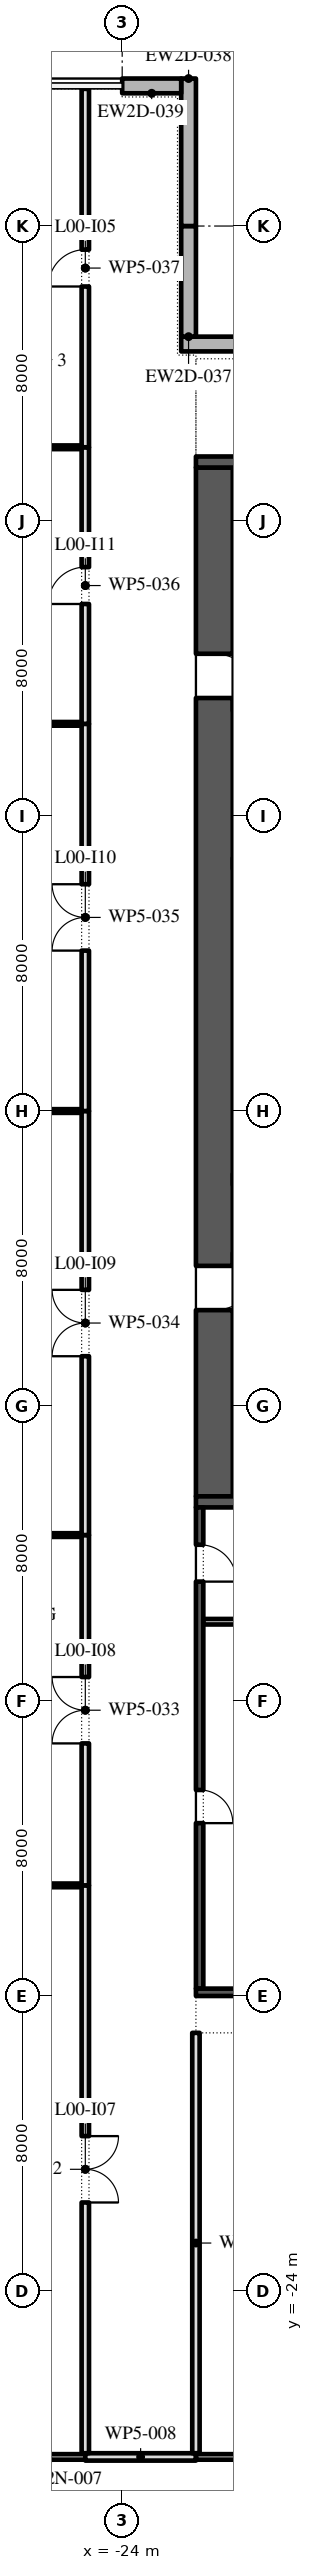
"""IFC4 building model, lengths in metres.
Left out: names, types, materials, properties, quantities, classifications, styles, units other than length and angle.
Written with IfcOpenShell. Run it as: python <this file> out.ifc"""

import sys

from ifc_helpers import new_model, si_unit, direction, frame, frame_2d, origin, place, context, subcontext, project, spatial, rectangle, extrude, element, fill, save


model = new_model("IFC4")
c1 = context("Model", 3, precision=1e-05, world=origin(), true_north=direction((0.0, 1.0)))
c2 = subcontext(c1, "Body", "Model", "MODEL_VIEW")
j1 = project(units=[si_unit("LENGTHUNIT", "METRE"), si_unit("PLANEANGLEUNIT", "RADIAN")], contexts=[c1])
p1 = place(None, origin())
s1 = spatial("IfcSite", under=j1, at=p1, CompositionType="ELEMENT")
p2 = place(p1, origin())
s2 = spatial("IfcBuilding", under=s1, at=p2, CompositionType="ELEMENT")
p3 = place(p2, origin())
s3 = spatial("IfcBuildingStorey", under=s2, at=p3, CompositionType="ELEMENT", Elevation=0.0)
p4 = place(p3, frame((-16.0, 28.8, 0.0), z_axis=(0.0, 0.0, 1.0), x_axis=(-1.0, 0.0, 0.0)))
e1 = element("IfcWall", 1, at=p4, inside=s3, PredefinedType="STANDARD", context=c2, shape_type="SweptSolid", body=[
    extrude(rectangle(XDim=6.4, YDim=0.4, at=frame_2d((3.2, 0.0))), origin(), (0.0, 0.0, 1.0), 7.7),
])
p5 = place(p3, frame((-22.2, 29.0, 0.0), z_axis=(0.0, 0.0, 1.0), x_axis=(0.0, 1.0, 0.0)))
e2 = element("IfcWall", 2, at=p5, inside=s3, PredefinedType="STANDARD", context=c2, shape_type="SweptSolid", body=[
    extrude(rectangle(XDim=3.0, YDim=0.4, at=frame_2d((1.5, 0.0))), origin(), (0.0, 0.0, 1.0), 7.7),
])
p6 = place(p3, frame((-22.2, 32.0, 0.0), z_axis=(0.0, 0.0, 1.0), x_axis=(0.0, 1.0, 0.0)))
e3 = element("IfcWall", 3, at=p6, inside=s3, PredefinedType="STANDARD", context=c2, shape_type="SweptSolid", body=[
    extrude(rectangle(XDim=4.0, YDim=0.4, at=frame_2d((2.0, 0.0))), origin(), (0.0, 0.0, 1.0), 7.7),
])
p7 = place(p3, frame((-22.4, 35.8, 0.0), z_axis=(0.0, 0.0, 1.0), x_axis=(-1.0, 0.0, 0.0)))
e4 = element("IfcWall", 4, at=p7, inside=s3, PredefinedType="STANDARD", context=c2, shape_type="SweptSolid", body=[
    extrude(rectangle(XDim=1.6, YDim=0.4, at=frame_2d((0.8, 0.0))), origin(), (0.0, 0.0, 1.0), 7.7),
])
p8 = place(p3, frame((-21.5, -2.45, 0.0), z_axis=(0.0, 0.0, 1.0), x_axis=(0.0, 1.0, 0.0)))
e5 = element("IfcWall", 5, at=p8, inside=s3, PredefinedType="SHEAR", context=c2, shape_type="SweptSolid", body=[
    extrude(rectangle(XDim=27.9, YDim=1.0, at=frame_2d((13.95, 0.0))), origin(), (0.0, 0.0, 1.0), 7.7),
])
p9 = place(p8, frame((5.05, 0.0, 0.0)))
e6 = element("IfcOpeningElement", 6, at=p9, cuts=e5, PredefinedType="OPENING", context=c2, shape_type="SweptSolid", body=[
    extrude(rectangle(XDim=1.2, YDim=2.1, at=frame_2d((0.6, 1.05))), frame((0.0, 0.51, 0.0), z_axis=(0.0, -1.0, 0.0), x_axis=(1.0, 0.0, 0.0)), (0.0, 0.0, 1.0), 1.02),
])
p10 = place(p8, frame((21.65, 0.0, 0.0)))
e7 = element("IfcOpeningElement", 7, at=p10, cuts=e5, PredefinedType="OPENING", context=c2, shape_type="SweptSolid", body=[
    extrude(rectangle(XDim=1.2, YDim=2.1, at=frame_2d((0.6, 1.05))), frame((0.0, 0.51, 0.0), z_axis=(0.0, -1.0, 0.0), x_axis=(1.0, 0.0, 0.0)), (0.0, 0.0, 1.0), 1.02),
])
for number, where, z_axis, x_axis in (
    (8, (-22.0, -2.6, 0.0), (0.0, 0.0, 1.0), (1.0, 0.0, 0.0)),
    (9, (-22.0, 25.6, 0.0), (0.0, 0.0, 1.0), (1.0, 0.0, 0.0)),
):
    element("IfcWall", number, at=place(p3, frame(where, z_axis=z_axis, x_axis=x_axis)), inside=s3, PredefinedType="SHEAR", context=c2, shape_type="SweptSolid", body=[
        extrude(rectangle(XDim=12.0, YDim=0.3, at=frame_2d((6.0, 0.0))), origin(), (0.0, 0.0, 1.0), 7.7),
    ])
p11 = place(p3, frame((-21.9, -15.8, 0.0), z_axis=(0.0, 0.0, 1.0), x_axis=(0.0, 1.0, 0.0)))
e10 = element("IfcWall", 10, at=p11, inside=s3, PredefinedType="SHEAR", context=c2, shape_type="SweptSolid", body=[
    extrude(rectangle(XDim=13.05, YDim=0.2, at=frame_2d((6.525, 0.0))), origin(), (0.0, 0.0, 1.0), 7.7),
])
p12 = place(p11, frame((4.488, 0.0, 0.0)))
e11 = element("IfcOpeningElement", 11, at=p12, cuts=e10, PredefinedType="OPENING", context=c2, shape_type="SweptSolid", body=[
    extrude(rectangle(XDim=0.9, YDim=2.1, at=frame_2d((0.45, 1.05))), frame((0.0, 0.11, 0.0), z_axis=(0.0, -1.0, 0.0), x_axis=(1.0, 0.0, 0.0)), (0.0, 0.0, 1.0), 0.22),
])
p13 = place(p11, frame((11.038, 0.0, 0.0)))
e12 = element("IfcOpeningElement", 12, at=p13, cuts=e10, PredefinedType="OPENING", context=c2, shape_type="SweptSolid", body=[
    extrude(rectangle(XDim=1.0, YDim=2.1, at=frame_2d((0.5, 1.05))), frame((0.0, 0.11, 0.0), z_axis=(0.0, -1.0, 0.0), x_axis=(1.0, 0.0, 0.0)), (0.0, 0.0, 1.0), 0.22),
])
p14 = place(p3, frame((-22.0, -15.9, 0.0), z_axis=(0.0, 0.0, 1.0), x_axis=(1.0, 0.0, 0.0)))
e13 = element("IfcWall", 13, at=p14, inside=s3, PredefinedType="SHEAR", context=c2, shape_type="SweptSolid", body=[
    extrude(rectangle(XDim=12.0, YDim=0.2, at=frame_2d((6.0, 0.0))), origin(), (0.0, 0.0, 1.0), 7.7),
])
p15 = place(p3, frame((-21.8, -5.85, 0.0), z_axis=(0.0, 0.0, 1.0), x_axis=(1.0, 0.0, 0.0)))
e14 = element("IfcWall", 14, at=p15, inside=s3, PredefinedType="PARTITIONING", context=c2, shape_type="SweptSolid", body=[
    extrude(rectangle(XDim=5.725, YDim=0.15, at=frame_2d((2.863, 0.0))), origin(), (0.0, 0.0, 1.0), 7.7),
])
p16 = place(p3, frame((-27.0, -28.5, 0.0), z_axis=(0.0, 0.0, 1.0), x_axis=(1.0, 0.0, 0.0)))
e15 = element("IfcWall", 15, at=p16, inside=s3, PredefinedType="PARTITIONING", context=c2, shape_type="SweptSolid", body=[
    extrude(rectangle(XDim=2.0, YDim=0.15, at=frame_2d((1.0, 0.0))), origin(), (0.0, 0.0, 1.0), 7.7),
])
p17 = place(p3, frame((-25.0, -28.5, 0.0), z_axis=(0.0, 0.0, 1.0), x_axis=(1.0, 0.0, 0.0)))
e16 = element("IfcWall", 16, at=p17, inside=s3, PredefinedType="PARTITIONING", context=c2, shape_type="SweptSolid", body=[
    extrude(rectangle(XDim=3.0, YDim=0.2, at=frame_2d((1.5, 0.0))), origin(), (0.0, 0.0, 1.0), 7.7),
])
p18 = place(p3, frame((-22.0, -28.5, 0.0), z_axis=(0.0, 0.0, 1.0), x_axis=(1.0, 0.0, 0.0)))
e17 = element("IfcWall", 17, at=p18, inside=s3, PredefinedType="PARTITIONING", context=c2, shape_type="SweptSolid", body=[
    extrude(rectangle(XDim=11.6, YDim=0.15, at=frame_2d((5.8, 0.0))), origin(), (0.0, 0.0, 1.0), 7.7),
])
p19 = place(p18, frame((5.3, 0.0, 0.0)))
e18 = element("IfcOpeningElement", 18, at=p19, cuts=e17, PredefinedType="OPENING", context=c2, shape_type="SweptSolid", body=[
    extrude(rectangle(XDim=1.0, YDim=2.1, at=frame_2d((0.5, 1.05))), frame((0.0, 0.085, 0.0), z_axis=(0.0, -1.0, 0.0), x_axis=(1.0, 0.0, 0.0)), (0.0, 0.0, 1.0), 0.17),
])
p20 = place(p3, frame((-43.72, -13.0, 0.0), z_axis=(0.0, 0.0, 1.0), x_axis=(1.0, 0.0, 0.0)))
e19 = element("IfcWall", 19, at=p20, inside=s3, PredefinedType="PARTITIONING", context=c2, shape_type="SweptSolid", body=[
    extrude(rectangle(XDim=18.62, YDim=0.1, at=frame_2d((9.31, 0.0))), origin(), (0.0, 0.0, 1.0), 7.7),
])
p21 = place(p3, frame((-31.7, -3.5, 0.0), z_axis=(0.0, 0.0, 1.0), x_axis=(1.0, 0.0, 0.0)))
e20 = element("IfcWall", 20, at=p21, inside=s3, PredefinedType="PARTITIONING", context=c2, shape_type="SweptSolid", body=[
    extrude(rectangle(XDim=6.6, YDim=0.1, at=frame_2d((3.3, 0.0))), origin(), (0.0, 0.0, 1.0), 7.7),
])
p22 = place(p3, frame((-43.72, 8.0, 0.0), z_axis=(0.0, 0.0, 1.0), x_axis=(1.0, 0.0, 0.0)))
e21 = element("IfcWall", 21, at=p22, inside=s3, PredefinedType="PARTITIONING", context=c2, shape_type="SweptSolid", body=[
    extrude(rectangle(XDim=18.62, YDim=0.1, at=frame_2d((9.31, 0.0))), origin(), (0.0, 0.0, 1.0), 7.7),
])
p23 = place(p3, frame((-43.5, 18.5, 0.0), z_axis=(0.0, 0.0, 1.0), x_axis=(1.0, 0.0, 0.0)))
e22 = element("IfcWall", 22, at=p23, inside=s3, PredefinedType="PARTITIONING", context=c2, shape_type="SweptSolid", body=[
    extrude(rectangle(XDim=18.4, YDim=0.1, at=frame_2d((9.2, 0.0))), origin(), (0.0, 0.0, 1.0), 7.7),
])
p24 = place(p3, frame((-34.0, 26.0, 0.0), z_axis=(0.0, 0.0, 1.0), x_axis=(1.0, 0.0, 0.0)))
e23 = element("IfcWall", 23, at=p24, inside=s3, PredefinedType="PARTITIONING", context=c2, shape_type="SweptSolid", body=[
    extrude(rectangle(XDim=8.9, YDim=0.1, at=frame_2d((4.45, 0.0))), origin(), (0.0, 0.0, 1.0), 7.7),
])
p25 = place(p3, frame((-25.0, -28.4, 0.0), z_axis=(0.0, 0.0, 1.0), x_axis=(0.0, 1.0, 0.0)))
e24 = element("IfcWall", 24, at=p25, inside=s3, PredefinedType="PARTITIONING", context=c2, shape_type="SweptSolid", body=[
    extrude(rectangle(XDim=15.4, YDim=0.2, at=frame_2d((7.7, 0.0))), origin(), (0.0, 0.0, 1.0), 7.7),
])
p26 = place(p25, frame((6.8, 0.0, 0.0)))
e25 = element("IfcOpeningElement", 25, at=p26, cuts=e24, PredefinedType="OPENING", context=c2, shape_type="SweptSolid", body=[
    extrude(rectangle(XDim=1.8, YDim=2.1, at=frame_2d((0.9, 1.05))), frame((0.0, 0.11, 0.0), z_axis=(0.0, -1.0, 0.0), x_axis=(1.0, 0.0, 0.0)), (0.0, 0.0, 1.0), 0.22),
])
p27 = place(p3, frame((-25.0, -13.0, 0.0), z_axis=(0.0, 0.0, 1.0), x_axis=(0.0, 1.0, 0.0)))
e26 = element("IfcWall", 26, at=p27, inside=s3, PredefinedType="PARTITIONING", context=c2, shape_type="SweptSolid", body=[
    extrude(rectangle(XDim=9.5, YDim=0.2, at=frame_2d((4.75, 0.0))), origin(), (0.0, 0.0, 1.0), 7.7),
])
p28 = place(p27, frame((3.85, 0.0, 0.0)))
e27 = element("IfcOpeningElement", 27, at=p28, cuts=e26, PredefinedType="OPENING", context=c2, shape_type="SweptSolid", body=[
    extrude(rectangle(XDim=1.8, YDim=2.1, at=frame_2d((0.9, 1.05))), frame((0.0, 0.11, 0.0), z_axis=(0.0, -1.0, 0.0), x_axis=(1.0, 0.0, 0.0)), (0.0, 0.0, 1.0), 0.22),
])
p29 = place(p3, frame((-25.0, -3.5, 0.0), z_axis=(0.0, 0.0, 1.0), x_axis=(0.0, 1.0, 0.0)))
e28 = element("IfcWall", 28, at=p29, inside=s3, PredefinedType="PARTITIONING", context=c2, shape_type="SweptSolid", body=[
    extrude(rectangle(XDim=11.5, YDim=0.2, at=frame_2d((5.75, 0.0))), origin(), (0.0, 0.0, 1.0), 7.7),
])
p30 = place(p29, frame((4.85, 0.0, 0.0)))
e29 = element("IfcOpeningElement", 29, at=p30, cuts=e28, PredefinedType="OPENING", context=c2, shape_type="SweptSolid", body=[
    extrude(rectangle(XDim=1.8, YDim=2.1, at=frame_2d((0.9, 1.05))), frame((0.0, 0.11, 0.0), z_axis=(0.0, -1.0, 0.0), x_axis=(1.0, 0.0, 0.0)), (0.0, 0.0, 1.0), 0.22),
])
p31 = place(p3, frame((-25.0, 8.0, 0.0), z_axis=(0.0, 0.0, 1.0), x_axis=(0.0, 1.0, 0.0)))
e30 = element("IfcWall", 30, at=p31, inside=s3, PredefinedType="PARTITIONING", context=c2, shape_type="SweptSolid", body=[
    extrude(rectangle(XDim=10.5, YDim=0.2, at=frame_2d((5.25, 0.0))), origin(), (0.0, 0.0, 1.0), 7.7),
])
p32 = place(p31, frame((4.35, 0.0, 0.0)))
e31 = element("IfcOpeningElement", 31, at=p32, cuts=e30, PredefinedType="OPENING", context=c2, shape_type="SweptSolid", body=[
    extrude(rectangle(XDim=1.8, YDim=2.1, at=frame_2d((0.9, 1.05))), frame((0.0, 0.11, 0.0), z_axis=(0.0, -1.0, 0.0), x_axis=(1.0, 0.0, 0.0)), (0.0, 0.0, 1.0), 0.22),
])
p33 = place(p3, frame((-25.0, 18.5, 0.0), z_axis=(0.0, 0.0, 1.0), x_axis=(0.0, 1.0, 0.0)))
e32 = element("IfcWall", 32, at=p33, inside=s3, PredefinedType="PARTITIONING", context=c2, shape_type="SweptSolid", body=[
    extrude(rectangle(XDim=7.5, YDim=0.2, at=frame_2d((3.75, 0.0))), origin(), (0.0, 0.0, 1.0), 7.7),
])
p34 = place(p33, frame((3.25, 0.0, 0.0)))
e33 = element("IfcOpeningElement", 33, at=p34, cuts=e32, PredefinedType="OPENING", context=c2, shape_type="SweptSolid", body=[
    extrude(rectangle(XDim=1.0, YDim=2.1, at=frame_2d((0.5, 1.05))), frame((0.0, 0.11, 0.0), z_axis=(0.0, -1.0, 0.0), x_axis=(1.0, 0.0, 0.0)), (0.0, 0.0, 1.0), 0.22),
])
p35 = place(p3, frame((-25.0, 26.0, 0.0), z_axis=(0.0, 0.0, 1.0), x_axis=(0.0, 1.0, 0.0)))
e34 = element("IfcWall", 34, at=p35, inside=s3, PredefinedType="PARTITIONING", context=c2, shape_type="SweptSolid", body=[
    extrude(rectangle(XDim=9.72, YDim=0.2, at=frame_2d((4.86, 0.0))), origin(), (0.0, 0.0, 1.0), 7.7),
])
p36 = place(p35, frame((4.36, 0.0, 0.0)))
e35 = element("IfcOpeningElement", 35, at=p36, cuts=e34, PredefinedType="OPENING", context=c2, shape_type="SweptSolid", body=[
    extrude(rectangle(XDim=1.0, YDim=2.1, at=frame_2d((0.5, 1.05))), frame((0.0, 0.11, 0.0), z_axis=(0.0, -1.0, 0.0), x_axis=(1.0, 0.0, 0.0)), (0.0, 0.0, 1.0), 0.22),
])
p37 = place(p3, frame((-22.0, -28.4, 0.0), z_axis=(0.0, 0.0, 1.0), x_axis=(0.0, 1.0, 0.0)))
e36 = element("IfcWall", 36, at=p37, inside=s3, PredefinedType="PARTITIONING", context=c2, shape_type="SweptSolid", body=[
    extrude(rectangle(XDim=11.4, YDim=0.2, at=frame_2d((5.7, 0.0))), origin(), (0.0, 0.0, 1.0), 7.7),
])
p38 = place(p9, frame((1.2, 0.0, 0.0), z_axis=(0.0, 0.0, 1.0), x_axis=(-1.0, 0.0, 0.0)))
e37 = element("IfcDoor", 37, at=p38, inside=s3, OperationType="SINGLE_SWING_RIGHT", PredefinedType="DOOR", context=c2, shape_type="SweptSolid", body=[
    extrude(rectangle(XDim=1.2, YDim=2.1, at=frame_2d((0.6, 1.05))), frame((0.0, 0.025, 0.0), z_axis=(0.0, -1.0, 0.0), x_axis=(1.0, 0.0, 0.0)), (0.0, 0.0, 1.0), 0.05),
])
fill(e6, e37)
p39 = place(p10, frame((1.2, 0.0, 0.0), z_axis=(0.0, 0.0, 1.0), x_axis=(-1.0, 0.0, 0.0)))
e38 = element("IfcDoor", 38, at=p39, inside=s3, OperationType="SINGLE_SWING_LEFT", PredefinedType="DOOR", context=c2, shape_type="SweptSolid", body=[
    extrude(rectangle(XDim=1.2, YDim=2.1, at=frame_2d((0.6, 1.05))), frame((0.0, 0.025, 0.0), z_axis=(0.0, -1.0, 0.0), x_axis=(1.0, 0.0, 0.0)), (0.0, 0.0, 1.0), 0.05),
])
fill(e7, e38)
p40 = place(p12, frame((0.9, -0.15, 0.0), z_axis=(0.0, 0.0, 1.0), x_axis=(-1.0, 0.0, 0.0)))
e39 = element("IfcDoor", 39, at=p40, inside=s3, OperationType="SINGLE_SWING_LEFT", PredefinedType="DOOR", context=c2, shape_type="SweptSolid", body=[
    extrude(rectangle(XDim=0.9, YDim=2.1, at=frame_2d((0.45, 1.05))), frame((0.0, -0.05, 0.0), z_axis=(0.0, -1.0, 0.0), x_axis=(1.0, 0.0, 0.0)), (0.0, 0.0, 1.0), 0.05),
])
fill(e11, e39)
p41 = place(p13, frame((1.0, -0.15, 0.0), z_axis=(0.0, 0.0, 1.0), x_axis=(-1.0, 0.0, 0.0)))
e40 = element("IfcDoor", 40, at=p41, inside=s3, OperationType="SINGLE_SWING_LEFT", PredefinedType="DOOR", context=c2, shape_type="SweptSolid", body=[
    extrude(rectangle(XDim=1.0, YDim=2.1, at=frame_2d((0.5, 1.05))), frame((0.0, -0.05, 0.0), z_axis=(0.0, -1.0, 0.0), x_axis=(1.0, 0.0, 0.0)), (0.0, 0.0, 1.0), 0.05),
])
fill(e12, e40)
p42 = place(p36, origin())
e41 = element("IfcDoor", 41, at=p42, inside=s3, OperationType="SINGLE_SWING_RIGHT", PredefinedType="DOOR", context=c2, shape_type="SweptSolid", body=[
    extrude(rectangle(XDim=1.0, YDim=2.1, at=frame_2d((0.5, 1.05))), frame((0.0, 0.025, 0.0), z_axis=(0.0, -1.0, 0.0), x_axis=(1.0, 0.0, 0.0)), (0.0, 0.0, 1.0), 0.05),
])
fill(e35, e41)
p43 = place(p26, frame((1.8, 0.0, 0.0), z_axis=(0.0, 0.0, 1.0), x_axis=(-1.0, 0.0, 0.0)))
e42 = element("IfcDoor", 42, at=p43, inside=s3, OperationType="SINGLE_SWING_LEFT", PredefinedType="DOOR", context=c2, shape_type="SweptSolid", body=[
    extrude(rectangle(XDim=1.8, YDim=2.1, at=frame_2d((0.9, 1.05))), frame((0.0, 0.025, 0.0), z_axis=(0.0, -1.0, 0.0), x_axis=(1.0, 0.0, 0.0)), (0.0, 0.0, 1.0), 0.05),
])
fill(e25, e42)
p44 = place(p28, origin())
e43 = element("IfcDoor", 43, at=p44, inside=s3, OperationType="SINGLE_SWING_LEFT", PredefinedType="DOOR", context=c2, shape_type="SweptSolid", body=[
    extrude(rectangle(XDim=1.8, YDim=2.1, at=frame_2d((0.9, 1.05))), frame((0.0, 0.025, 0.0), z_axis=(0.0, -1.0, 0.0), x_axis=(1.0, 0.0, 0.0)), (0.0, 0.0, 1.0), 0.05),
])
fill(e27, e43)
p45 = place(p30, origin())
e44 = element("IfcDoor", 44, at=p45, inside=s3, OperationType="SINGLE_SWING_LEFT", PredefinedType="DOOR", context=c2, shape_type="SweptSolid", body=[
    extrude(rectangle(XDim=1.8, YDim=2.1, at=frame_2d((0.9, 1.05))), frame((0.0, 0.025, 0.0), z_axis=(0.0, -1.0, 0.0), x_axis=(1.0, 0.0, 0.0)), (0.0, 0.0, 1.0), 0.05),
])
fill(e29, e44)
p46 = place(p32, origin())
e45 = element("IfcDoor", 45, at=p46, inside=s3, OperationType="SINGLE_SWING_RIGHT", PredefinedType="DOOR", context=c2, shape_type="SweptSolid", body=[
    extrude(rectangle(XDim=1.8, YDim=2.1, at=frame_2d((0.9, 1.05))), frame((0.0, 0.025, 0.0), z_axis=(0.0, -1.0, 0.0), x_axis=(1.0, 0.0, 0.0)), (0.0, 0.0, 1.0), 0.05),
])
fill(e31, e45)
p47 = place(p34, origin())
e46 = element("IfcDoor", 46, at=p47, inside=s3, OperationType="SINGLE_SWING_RIGHT", PredefinedType="DOOR", context=c2, shape_type="SweptSolid", body=[
    extrude(rectangle(XDim=1.0, YDim=2.1, at=frame_2d((0.5, 1.05))), frame((0.0, 0.025, 0.0), z_axis=(0.0, -1.0, 0.0), x_axis=(1.0, 0.0, 0.0)), (0.0, 0.0, 1.0), 0.05),
])
fill(e33, e46)
save(model, sys.argv[1])
